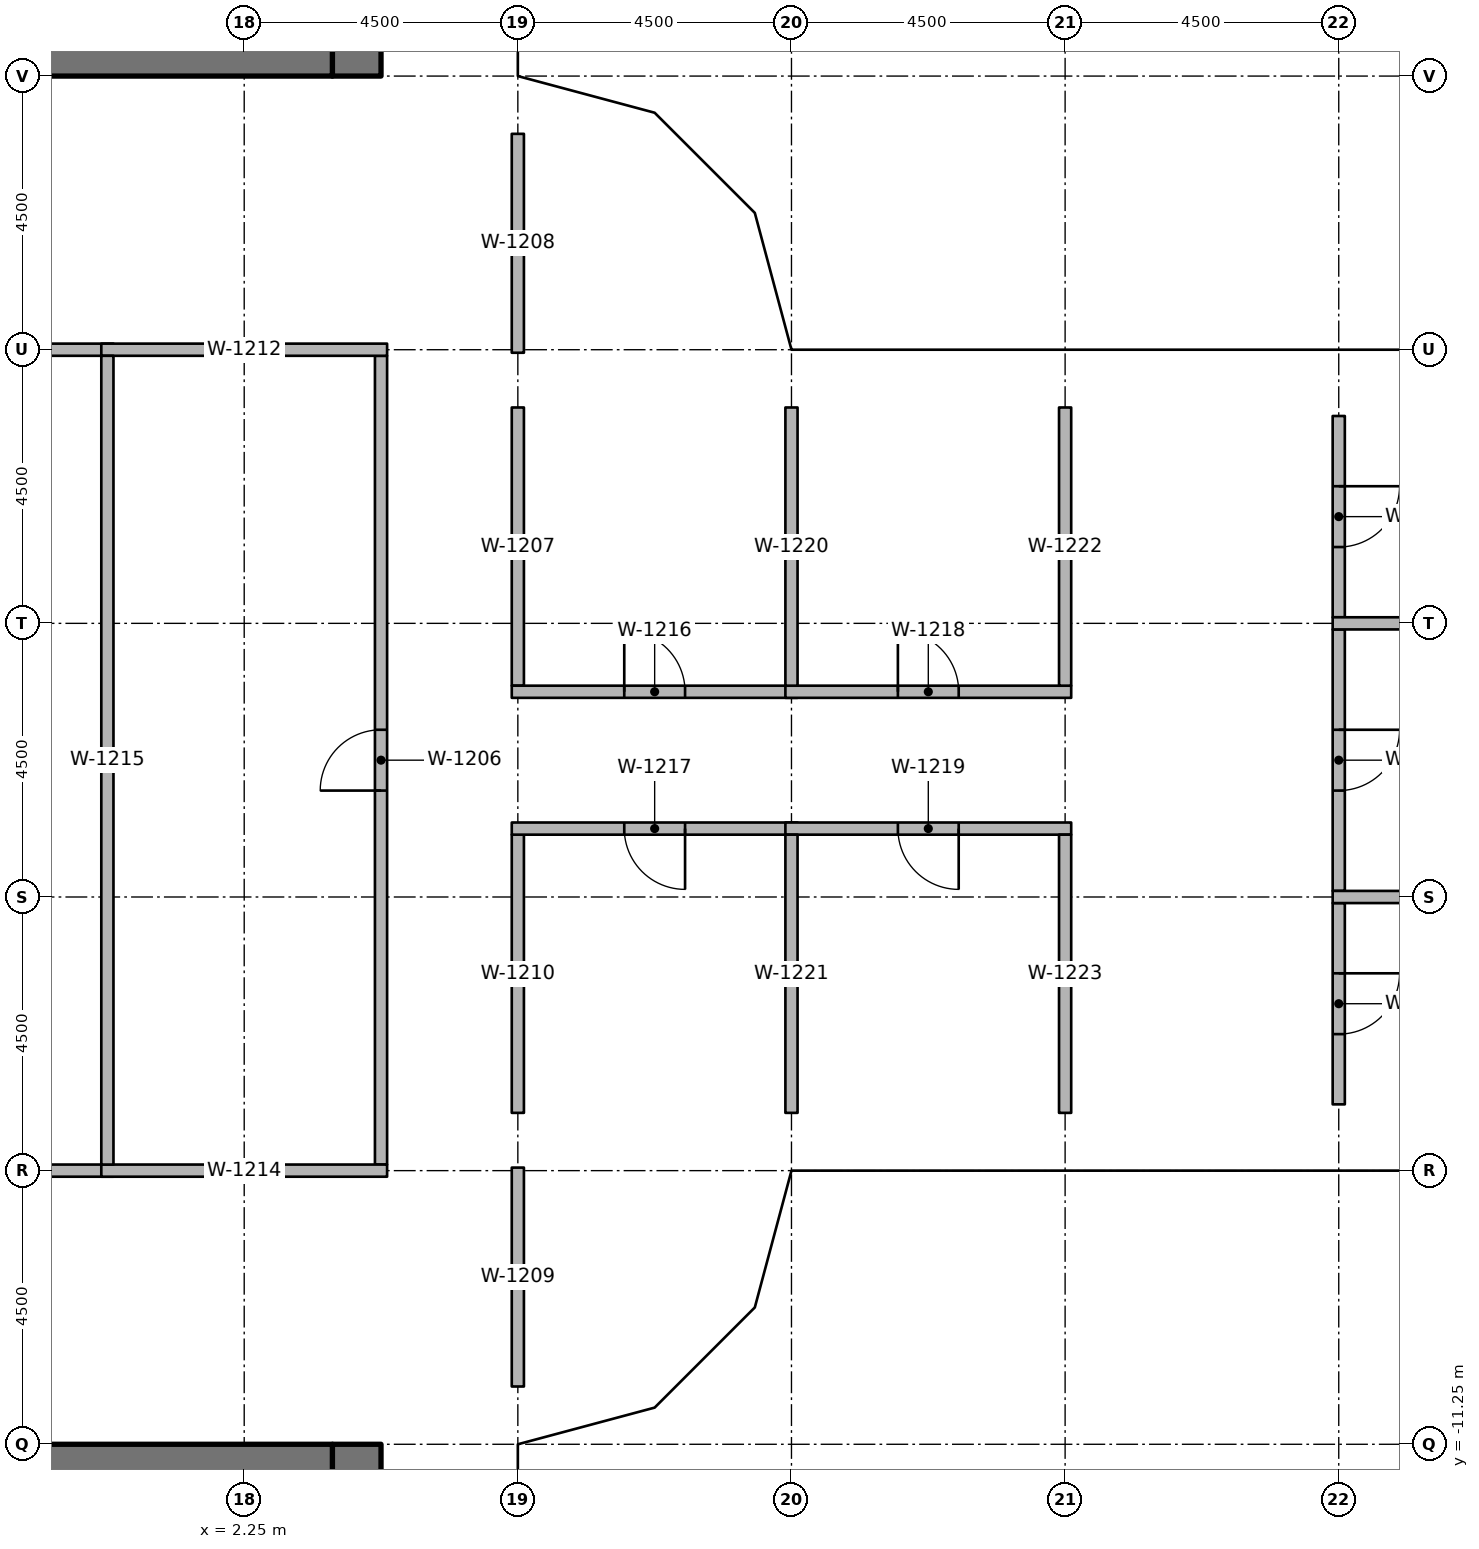
"""IFC4 building model, lengths in metres.
Left out: names, types, materials, properties, quantities, classifications, styles, units other than length and angle.
Written with IfcOpenShell. Run it as: python <this file> out.ifc"""

import sys

from ifc_helpers import new_model, si_unit, direction, frame, frame_2d, origin, origin_2d, place, context, subcontext, project, spatial, rectangle, extrude, element, fill, save


model = new_model("IFC4")
c1 = context("Model", 3, precision=1e-05, world=origin(), true_north=direction((0.0, 1.0)))
c2 = subcontext(c1, "Body", "Model", "MODEL_VIEW")
j1 = project(units=[si_unit("LENGTHUNIT", "METRE"), si_unit("PLANEANGLEUNIT", "RADIAN")], contexts=[c1])
p1 = place(None, origin())
s1 = spatial("IfcSite", under=j1, at=p1, CompositionType="ELEMENT")
p2 = place(p1, origin())
s2 = spatial("IfcBuilding", under=s1, at=p2, CompositionType="ELEMENT")
p3 = place(p2, frame((0.0, 0.0, 128.4)))
s3 = spatial("IfcBuildingStorey", under=s2, at=p3, CompositionType="ELEMENT", Elevation=128.4)
for number, where, z_axis, x_axis in (
    (1, (6.25, -10.75, 0.0), (0.0, 0.0, 1.0), (1.0, 0.0, 0.0)),
    (2, (6.25, -6.25, 0.0), (0.0, 0.0, 1.0), (1.0, 0.0, 0.0)),
    (3, (6.25, 6.25, 0.0), (0.0, 0.0, 1.0), (1.0, 0.0, 0.0)),
    (4, (6.25, 10.75, 0.0), (0.0, 0.0, 1.0), (1.0, 0.0, 0.0)),
    (5, (10.75, -6.25, 0.0), (0.0, 0.0, 1.0), (1.0, 0.0, 0.0)),
    (6, (10.75, 6.25, 0.0), (0.0, 0.0, 1.0), (1.0, 0.0, 0.0)),
    (7, (15.75, -6.25, 0.0), (0.0, 0.0, 1.0), (1.0, 0.0, 0.0)),
    (8, (15.75, 6.25, 0.0), (0.0, 0.0, 1.0), (1.0, 0.0, 0.0)),
    (9, (20.25, -6.11, 0.0), (0.0, 0.0, 1.0), (1.0, 0.0, 0.0)),
    (10, (20.25, 6.11, 0.0), (0.0, 0.0, 1.0), (1.0, 0.0, 0.0)),
):
    element("IfcColumn", number, at=place(p3, frame(where, z_axis=z_axis, x_axis=x_axis)), inside=s3, PredefinedType="COLUMN", context=c2, shape_type="SweptSolid", body=[
        extrude(rectangle(XDim=0.9, YDim=0.9, at=origin_2d()), origin(), (0.0, 0.0, 1.0), 3.65),
    ])
p4 = place(p3, frame((4.1, 11.25, 0.0), z_axis=(0.0, 0.0, 1.0), x_axis=(0.0, 1.0, 0.0)))
e11 = element("IfcWall", 11, at=p4, inside=s3, PredefinedType="SHEAR", context=c2, shape_type="SweptSolid", body=[
    extrude(rectangle(XDim=15.0, YDim=0.8, at=frame_2d((7.5, 0.0))), origin(), (0.0, 0.0, 1.0), 3.8),
])
p5 = place(p4, frame((7.15, 0.0, 0.0)))
e12 = element("IfcOpeningElement", 12, at=p5, cuts=e11, PredefinedType="OPENING", context=c2, shape_type="SweptSolid", body=[
    extrude(rectangle(XDim=1.5, YDim=2.3, at=frame_2d((0.75, 1.15))), frame((0.0, 0.41, 0.0), z_axis=(0.0, -1.0, 0.0), x_axis=(1.0, 0.0, 0.0)), (0.0, 0.0, 1.0), 0.82),
])
p6 = place(p4, frame((5.55, 0.0, 0.0)))
e13 = element("IfcOpeningElement", 13, at=p6, cuts=e11, PredefinedType="OPENING", context=c2, shape_type="SweptSolid", body=[
    extrude(rectangle(XDim=1.2, YDim=2.1, at=frame_2d((0.6, 1.05))), frame((0.0, 0.41, 0.0), z_axis=(0.0, -1.0, 0.0), x_axis=(1.0, 0.0, 0.0)), (0.0, 0.0, 1.0), 0.82),
])
p7 = place(p3, frame((-3.7, 11.65, 0.0), z_axis=(0.0, 0.0, 1.0), x_axis=(1.0, 0.0, 0.0)))
e14 = element("IfcWall", 14, at=p7, inside=s3, PredefinedType="SHEAR", context=c2, shape_type="SweptSolid", body=[
    extrude(rectangle(XDim=7.4, YDim=0.8, at=frame_2d((3.7, 0.0))), origin(), (0.0, 0.0, 1.0), 3.8),
])
p8 = place(p3, frame((4.1, -11.25, 0.0), z_axis=(0.0, 0.0, 1.0), x_axis=(0.0, -1.0, 0.0)))
e15 = element("IfcWall", 15, at=p8, inside=s3, PredefinedType="SHEAR", context=c2, shape_type="SweptSolid", body=[
    extrude(rectangle(XDim=15.0, YDim=0.8, at=frame_2d((7.5, 0.0))), origin(), (0.0, 0.0, 1.0), 3.8),
])
p9 = place(p8, frame((7.15, 0.0, 0.0)))
e16 = element("IfcOpeningElement", 16, at=p9, cuts=e15, PredefinedType="OPENING", context=c2, shape_type="SweptSolid", body=[
    extrude(rectangle(XDim=1.5, YDim=2.3, at=frame_2d((0.75, 1.15))), frame((0.0, 0.41, 0.0), z_axis=(0.0, -1.0, 0.0), x_axis=(1.0, 0.0, 0.0)), (0.0, 0.0, 1.0), 0.82),
])
p10 = place(p8, frame((13.9, 0.0, 0.0)))
e17 = element("IfcOpeningElement", 17, at=p10, cuts=e15, PredefinedType="OPENING", context=c2, shape_type="SweptSolid", body=[
    extrude(rectangle(XDim=0.9, YDim=2.1, at=frame_2d((0.45, 1.05))), frame((0.0, 0.41, 0.0), z_axis=(0.0, -1.0, 0.0), x_axis=(1.0, 0.0, 0.0)), (0.0, 0.0, 1.0), 0.82),
])
p11 = place(p8, frame((1.15, 0.0, 0.0)))
e18 = element("IfcOpeningElement", 18, at=p11, cuts=e15, PredefinedType="OPENING", context=c2, shape_type="SweptSolid", body=[
    extrude(rectangle(XDim=1.2, YDim=2.1, at=frame_2d((0.6, 1.05))), frame((0.0, 0.41, 0.0), z_axis=(0.0, -1.0, 0.0), x_axis=(1.0, 0.0, 0.0)), (0.0, 0.0, 1.0), 0.82),
])
p12 = place(p3, frame((-3.7, -11.65, 0.0), z_axis=(0.0, 0.0, 1.0), x_axis=(1.0, 0.0, 0.0)))
e19 = element("IfcWall", 19, at=p12, inside=s3, PredefinedType="SHEAR", context=c2, shape_type="SweptSolid", body=[
    extrude(rectangle(XDim=7.4, YDim=0.8, at=frame_2d((3.7, 0.0))), origin(), (0.0, 0.0, 1.0), 3.8),
])
p13 = place(p3, frame((4.5, -6.65, 0.0), z_axis=(0.0, 0.0, 1.0), x_axis=(0.0, 1.0, 0.0)))
e20 = element("IfcWall", 20, at=p13, inside=s3, PredefinedType="PARTITIONING", context=c2, shape_type="SweptSolid", body=[
    extrude(rectangle(XDim=13.3, YDim=0.2, at=frame_2d((6.65, 0.0))), origin(), (0.0, 0.0, 1.0), 2.738),
])
p14 = place(p13, frame((6.15, 0.0, 0.0)))
e21 = element("IfcOpeningElement", 21, at=p14, cuts=e20, PredefinedType="OPENING", context=c2, shape_type="SweptSolid", body=[
    extrude(rectangle(XDim=1.0, YDim=2.1, at=frame_2d((0.5, 1.05))), frame((0.0, 0.11, 0.0), z_axis=(0.0, -1.0, 0.0), x_axis=(1.0, 0.0, 0.0)), (0.0, 0.0, 1.0), 0.22),
])
p15 = place(p3, frame((6.75, 1.225, 0.0), z_axis=(0.0, 0.0, 1.0), x_axis=(0.0, 1.0, 0.0)))
e22 = element("IfcWall", 22, at=p15, inside=s3, PredefinedType="PARTITIONING", context=c2, shape_type="SweptSolid", body=[
    extrude(rectangle(XDim=4.575, YDim=0.2, at=frame_2d((2.288, 0.0))), origin(), (0.0, 0.0, 1.0), 2.738),
])
for number, where, z_axis, x_axis in (
    (23, (6.75, 6.7, 0.0), (0.0, 0.0, 1.0), (0.0, 1.0, 0.0)),
    (24, (6.75, -10.3, 0.0), (0.0, 0.0, 1.0), (0.0, 1.0, 0.0)),
):
    element("IfcWall", number, at=place(p3, frame(where, z_axis=z_axis, x_axis=x_axis)), inside=s3, PredefinedType="PARTITIONING", context=c2, shape_type="SweptSolid", body=[
        extrude(rectangle(XDim=3.6, YDim=0.2, at=frame_2d((1.8, 0.0))), origin(), (0.0, 0.0, 1.0), 2.738),
    ])
p16 = place(p3, frame((6.75, -5.8, 0.0), z_axis=(0.0, 0.0, 1.0), x_axis=(0.0, 1.0, 0.0)))
e25 = element("IfcWall", 25, at=p16, inside=s3, PredefinedType="PARTITIONING", context=c2, shape_type="SweptSolid", body=[
    extrude(rectangle(XDim=4.575, YDim=0.2, at=frame_2d((2.288, 0.0))), origin(), (0.0, 0.0, 1.0), 2.738),
])
for number, where, z_axis, x_axis in (
    (26, (-4.6, 6.75, 0.0), (0.0, 0.0, 1.0), (1.0, 0.0, 0.0)),
    (27, (-0.1, 6.75, 0.0), (0.0, 0.0, 1.0), (1.0, 0.0, 0.0)),
    (28, (-4.6, -6.75, 0.0), (0.0, 0.0, 1.0), (1.0, 0.0, 0.0)),
    (29, (-0.1, -6.75, 0.0), (0.0, 0.0, 1.0), (1.0, 0.0, 0.0)),
):
    element("IfcWall", number, at=place(p3, frame(where, z_axis=z_axis, x_axis=x_axis)), inside=s3, PredefinedType="PARTITIONING", context=c2, shape_type="SweptSolid", body=[
        extrude(rectangle(XDim=4.7, YDim=0.2, at=frame_2d((2.35, 0.0))), origin(), (0.0, 0.0, 1.0), 2.738),
    ])
p17 = place(p3, frame((0.0, -6.65, 0.0), z_axis=(0.0, 0.0, 1.0), x_axis=(0.0, 1.0, 0.0)))
e30 = element("IfcWall", 30, at=p17, inside=s3, PredefinedType="PARTITIONING", context=c2, shape_type="SweptSolid", body=[
    extrude(rectangle(XDim=13.3, YDim=0.2, at=frame_2d((6.65, 0.0))), origin(), (0.0, 0.0, 1.0), 2.738),
])
p18 = place(p3, frame((6.65, 1.125, 0.0), z_axis=(0.0, 0.0, 1.0), x_axis=(1.0, 0.0, 0.0)))
e31 = element("IfcWall", 31, at=p18, inside=s3, PredefinedType="PARTITIONING", context=c2, shape_type="SweptSolid", body=[
    extrude(rectangle(XDim=4.7, YDim=0.2, at=frame_2d((2.35, 0.0))), origin(), (0.0, 0.0, 1.0), 2.738),
])
p19 = place(p18, frame((1.85, 0.0, 0.0)))
e32 = element("IfcOpeningElement", 32, at=p19, cuts=e31, PredefinedType="OPENING", context=c2, shape_type="SweptSolid", body=[
    extrude(rectangle(XDim=1.0, YDim=2.1, at=frame_2d((0.5, 1.05))), frame((0.0, 0.11, 0.0), z_axis=(0.0, -1.0, 0.0), x_axis=(1.0, 0.0, 0.0)), (0.0, 0.0, 1.0), 0.22),
])
p20 = place(p3, frame((11.35, -1.125, 0.0), z_axis=(0.0, 0.0, 1.0), x_axis=(-1.0, 0.0, 0.0)))
e33 = element("IfcWall", 33, at=p20, inside=s3, PredefinedType="PARTITIONING", context=c2, shape_type="SweptSolid", body=[
    extrude(rectangle(XDim=4.7, YDim=0.2, at=frame_2d((2.35, 0.0))), origin(), (0.0, 0.0, 1.0), 2.738),
])
p21 = place(p20, frame((1.85, 0.0, 0.0)))
e34 = element("IfcOpeningElement", 34, at=p21, cuts=e33, PredefinedType="OPENING", context=c2, shape_type="SweptSolid", body=[
    extrude(rectangle(XDim=1.0, YDim=2.1, at=frame_2d((0.5, 1.05))), frame((0.0, 0.11, 0.0), z_axis=(0.0, -1.0, 0.0), x_axis=(1.0, 0.0, 0.0)), (0.0, 0.0, 1.0), 0.22),
])
p22 = place(p3, frame((11.15, 1.125, 0.0), z_axis=(0.0, 0.0, 1.0), x_axis=(1.0, 0.0, 0.0)))
e35 = element("IfcWall", 35, at=p22, inside=s3, PredefinedType="PARTITIONING", context=c2, shape_type="SweptSolid", body=[
    extrude(rectangle(XDim=4.7, YDim=0.2, at=frame_2d((2.35, 0.0))), origin(), (0.0, 0.0, 1.0), 2.738),
])
p23 = place(p22, frame((1.85, 0.0, 0.0)))
e36 = element("IfcOpeningElement", 36, at=p23, cuts=e35, PredefinedType="OPENING", context=c2, shape_type="SweptSolid", body=[
    extrude(rectangle(XDim=1.0, YDim=2.1, at=frame_2d((0.5, 1.05))), frame((0.0, 0.11, 0.0), z_axis=(0.0, -1.0, 0.0), x_axis=(1.0, 0.0, 0.0)), (0.0, 0.0, 1.0), 0.22),
])
p24 = place(p3, frame((15.85, -1.125, 0.0), z_axis=(0.0, 0.0, 1.0), x_axis=(-1.0, 0.0, 0.0)))
e37 = element("IfcWall", 37, at=p24, inside=s3, PredefinedType="PARTITIONING", context=c2, shape_type="SweptSolid", body=[
    extrude(rectangle(XDim=4.7, YDim=0.2, at=frame_2d((2.35, 0.0))), origin(), (0.0, 0.0, 1.0), 2.738),
])
p25 = place(p24, frame((1.85, 0.0, 0.0)))
e38 = element("IfcOpeningElement", 38, at=p25, cuts=e37, PredefinedType="OPENING", context=c2, shape_type="SweptSolid", body=[
    extrude(rectangle(XDim=1.0, YDim=2.1, at=frame_2d((0.5, 1.05))), frame((0.0, 0.11, 0.0), z_axis=(0.0, -1.0, 0.0), x_axis=(1.0, 0.0, 0.0)), (0.0, 0.0, 1.0), 0.22),
])
for number, where, z_axis, x_axis in (
    (39, (11.25, 1.225, 0.0), (0.0, 0.0, 1.0), (0.0, 1.0, 0.0)),
    (40, (11.25, -5.8, 0.0), (0.0, 0.0, 1.0), (0.0, 1.0, 0.0)),
    (41, (15.75, 1.225, 0.0), (0.0, 0.0, 1.0), (0.0, 1.0, 0.0)),
    (42, (15.75, -5.8, 0.0), (0.0, 0.0, 1.0), (0.0, 1.0, 0.0)),
):
    element("IfcWall", number, at=place(p3, frame(where, z_axis=z_axis, x_axis=x_axis)), inside=s3, PredefinedType="PARTITIONING", context=c2, shape_type="SweptSolid", body=[
        extrude(rectangle(XDim=4.575, YDim=0.2, at=frame_2d((2.288, 0.0))), origin(), (0.0, 0.0, 1.0), 2.738),
    ])
p26 = place(p3, frame((20.25, -2.35, 0.0), z_axis=(0.0, 0.0, 1.0), x_axis=(0.0, -1.0, 0.0)))
e43 = element("IfcWall", 43, at=p26, inside=s3, PredefinedType="PARTITIONING", context=c2, shape_type="SweptSolid", body=[
    extrude(rectangle(XDim=3.31, YDim=0.2, at=frame_2d((1.655, 0.0))), origin(), (0.0, 0.0, 1.0), 2.738),
])
p27 = place(p26, frame((1.155, 0.0, 0.0)))
e44 = element("IfcOpeningElement", 44, at=p27, cuts=e43, PredefinedType="OPENING", context=c2, shape_type="SweptSolid", body=[
    extrude(rectangle(XDim=1.0, YDim=2.1, at=frame_2d((0.5, 1.05))), frame((0.0, 0.11, 0.0), z_axis=(0.0, -1.0, 0.0), x_axis=(1.0, 0.0, 0.0)), (0.0, 0.0, 1.0), 0.22),
])
p28 = place(p3, frame((20.25, 2.15, 0.0), z_axis=(0.0, 0.0, 1.0), x_axis=(0.0, -1.0, 0.0)))
e45 = element("IfcWall", 45, at=p28, inside=s3, PredefinedType="PARTITIONING", context=c2, shape_type="SweptSolid", body=[
    extrude(rectangle(XDim=4.3, YDim=0.2, at=frame_2d((2.15, 0.0))), origin(), (0.0, 0.0, 1.0), 2.738),
])
p29 = place(p28, frame((1.65, 0.0, 0.0)))
e46 = element("IfcOpeningElement", 46, at=p29, cuts=e45, PredefinedType="OPENING", context=c2, shape_type="SweptSolid", body=[
    extrude(rectangle(XDim=1.0, YDim=2.1, at=frame_2d((0.5, 1.05))), frame((0.0, 0.11, 0.0), z_axis=(0.0, -1.0, 0.0), x_axis=(1.0, 0.0, 0.0)), (0.0, 0.0, 1.0), 0.22),
])
p30 = place(p3, frame((20.25, 5.66, 0.0), z_axis=(0.0, 0.0, 1.0), x_axis=(0.0, -1.0, 0.0)))
e47 = element("IfcWall", 47, at=p30, inside=s3, PredefinedType="PARTITIONING", context=c2, shape_type="SweptSolid", body=[
    extrude(rectangle(XDim=3.31, YDim=0.2, at=frame_2d((1.655, 0.0))), origin(), (0.0, 0.0, 1.0), 2.738),
])
p31 = place(p30, frame((1.155, 0.0, 0.0)))
e48 = element("IfcOpeningElement", 48, at=p31, cuts=e47, PredefinedType="OPENING", context=c2, shape_type="SweptSolid", body=[
    extrude(rectangle(XDim=1.0, YDim=2.1, at=frame_2d((0.5, 1.05))), frame((0.0, 0.11, 0.0), z_axis=(0.0, -1.0, 0.0), x_axis=(1.0, 0.0, 0.0)), (0.0, 0.0, 1.0), 0.22),
])
for number, where, z_axis, x_axis in (
    (49, (20.15, -2.25, 0.0), (0.0, 0.0, 1.0), (1.0, 0.0, 0.0)),
    (50, (20.15, 2.25, 0.0), (0.0, 0.0, 1.0), (1.0, 0.0, 0.0)),
):
    element("IfcWall", number, at=place(p3, frame(where, z_axis=z_axis, x_axis=x_axis)), inside=s3, PredefinedType="PARTITIONING", context=c2, shape_type="SweptSolid", body=[
        extrude(rectangle(XDim=8.07, YDim=0.2, at=frame_2d((4.035, 0.0))), origin(), (0.0, 0.0, 1.0), 2.738),
    ])
p32 = place(p14, origin())
e51 = element("IfcDoor", 51, at=p32, inside=s3, OperationType="SINGLE_SWING_RIGHT", PredefinedType="DOOR", context=c2, shape_type="SweptSolid", body=[
    extrude(rectangle(XDim=1.0, YDim=2.1, at=frame_2d((0.5, 1.05))), frame((0.0, 0.025, 0.0), z_axis=(0.0, -1.0, 0.0), x_axis=(1.0, 0.0, 0.0)), (0.0, 0.0, 1.0), 0.05),
])
fill(e21, e51)
p33 = place(p19, origin())
e52 = element("IfcDoor", 52, at=p33, inside=s3, OperationType="SINGLE_SWING_RIGHT", PredefinedType="DOOR", context=c2, shape_type="SweptSolid", body=[
    extrude(rectangle(XDim=1.0, YDim=2.1, at=frame_2d((0.5, 1.05))), frame((0.0, 0.025, 0.0), z_axis=(0.0, -1.0, 0.0), x_axis=(1.0, 0.0, 0.0)), (0.0, 0.0, 1.0), 0.05),
])
fill(e32, e52)
p34 = place(p23, origin())
e53 = element("IfcDoor", 53, at=p34, inside=s3, OperationType="SINGLE_SWING_RIGHT", PredefinedType="DOOR", context=c2, shape_type="SweptSolid", body=[
    extrude(rectangle(XDim=1.0, YDim=2.1, at=frame_2d((0.5, 1.05))), frame((0.0, 0.025, 0.0), z_axis=(0.0, -1.0, 0.0), x_axis=(1.0, 0.0, 0.0)), (0.0, 0.0, 1.0), 0.05),
])
fill(e36, e53)
p35 = place(p21, origin())
e54 = element("IfcDoor", 54, at=p35, inside=s3, OperationType="SINGLE_SWING_RIGHT", PredefinedType="DOOR", context=c2, shape_type="SweptSolid", body=[
    extrude(rectangle(XDim=1.0, YDim=2.1, at=frame_2d((0.5, 1.05))), frame((0.0, 0.025, 0.0), z_axis=(0.0, -1.0, 0.0), x_axis=(1.0, 0.0, 0.0)), (0.0, 0.0, 1.0), 0.05),
])
fill(e34, e54)
p36 = place(p25, origin())
e55 = element("IfcDoor", 55, at=p36, inside=s3, OperationType="SINGLE_SWING_RIGHT", PredefinedType="DOOR", context=c2, shape_type="SweptSolid", body=[
    extrude(rectangle(XDim=1.0, YDim=2.1, at=frame_2d((0.5, 1.05))), frame((0.0, 0.025, 0.0), z_axis=(0.0, -1.0, 0.0), x_axis=(1.0, 0.0, 0.0)), (0.0, 0.0, 1.0), 0.05),
])
fill(e38, e55)
p37 = place(p27, origin())
e56 = element("IfcDoor", 56, at=p37, inside=s3, OperationType="SINGLE_SWING_LEFT", PredefinedType="DOOR", context=c2, shape_type="SweptSolid", body=[
    extrude(rectangle(XDim=1.0, YDim=2.1, at=frame_2d((0.5, 1.05))), frame((0.0, 0.025, 0.0), z_axis=(0.0, -1.0, 0.0), x_axis=(1.0, 0.0, 0.0)), (0.0, 0.0, 1.0), 0.05),
])
fill(e44, e56)
p38 = place(p29, origin())
e57 = element("IfcDoor", 57, at=p38, inside=s3, OperationType="SINGLE_SWING_RIGHT", PredefinedType="DOOR", context=c2, shape_type="SweptSolid", body=[
    extrude(rectangle(XDim=1.0, YDim=2.1, at=frame_2d((0.5, 1.05))), frame((0.0, 0.025, 0.0), z_axis=(0.0, -1.0, 0.0), x_axis=(1.0, 0.0, 0.0)), (0.0, 0.0, 1.0), 0.05),
])
fill(e46, e57)
p39 = place(p31, origin())
e58 = element("IfcDoor", 58, at=p39, inside=s3, OperationType="SINGLE_SWING_RIGHT", PredefinedType="DOOR", context=c2, shape_type="SweptSolid", body=[
    extrude(rectangle(XDim=1.0, YDim=2.1, at=frame_2d((0.5, 1.05))), frame((0.0, 0.025, 0.0), z_axis=(0.0, -1.0, 0.0), x_axis=(1.0, 0.0, 0.0)), (0.0, 0.0, 1.0), 0.05),
])
fill(e48, e58)
save(model, sys.argv[1])
